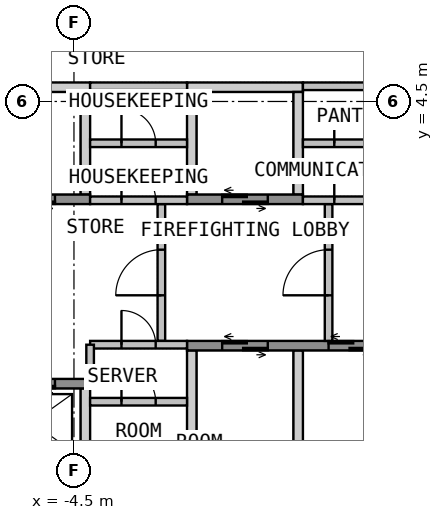
"""IFC4 building model, lengths in metres.
Left out: names, types, materials, properties, quantities, classifications, styles, units other than length and angle.
Written with IfcOpenShell. Run it as: python <this file> out.ifc"""

import sys

from ifc_helpers import new_model, si_unit, direction, frame, frame_2d, origin, place, context, subcontext, project, spatial, polyline, rectangle, outline, extrude, element, fill, save


model = new_model("IFC4")
c1 = context("Model", 3, precision=1e-05, world=origin(), true_north=direction((0.0, 1.0)))
c2 = subcontext(c1, "Body", "Model", "MODEL_VIEW")
j1 = project(units=[si_unit("LENGTHUNIT", "METRE"), si_unit("PLANEANGLEUNIT", "RADIAN")], contexts=[c1])
p1 = place(None, origin())
s1 = spatial("IfcSite", under=j1, at=p1, CompositionType="ELEMENT")
p2 = place(p1, origin())
s2 = spatial("IfcBuilding", under=s1, at=p2, CompositionType="ELEMENT")
p3 = place(p2, frame((0.0, 0.0, 132.6)))
s3 = spatial("IfcBuildingStorey", under=s2, at=p3, CompositionType="ELEMENT", Elevation=132.6)
p4 = place(p3, origin())
e1 = element("IfcWall", 1, at=p4, inside=s3, PredefinedType="SHEAR", context=c2, shape_type="SweptSolid", body=[
    extrude(outline(polyline([(-12.9, 4.75), (-4.075, 4.75), (-4.075, 5.0), (-12.9, 5.0), (-12.9, 4.75)])), origin(), (0.0, 0.0, 1.0), 3.575),
])
p5 = place(p3, origin())
e2 = element("IfcWall", 2, at=p5, inside=s3, PredefinedType="SHEAR", context=c2, shape_type="SweptSolid", body=[
    extrude(outline(polyline([(-1.525, 4.75), (1.525, 4.75), (1.525, 5.0), (-1.525, 5.0), (-1.525, 4.75)])), origin(), (0.0, 0.0, 1.0), 3.575),
])
p6 = place(p3, origin())
e3 = element("IfcWall", 3, at=p6, inside=s3, PredefinedType="SHEAR", context=c2, shape_type="SweptSolid", body=[
    extrude(outline(polyline([(-4.325, 2.05), (-4.075, 2.05), (-4.075, 4.75), (-4.325, 4.75), (-4.325, 2.05)])), origin(), (0.0, 0.0, 1.0), 3.575),
])
p7 = place(p3, origin())
e4 = element("IfcWall", 4, at=p7, inside=s3, PredefinedType="SHEAR", context=c2, shape_type="SweptSolid", body=[
    extrude(outline(polyline([(-1.525, 2.05), (-1.275, 2.05), (-1.275, 4.75), (-1.525, 4.75), (-1.525, 2.05)])), origin(), (0.0, 0.0, 1.0), 3.575),
])
p8 = place(p3, origin())
e5 = element("IfcWall", 5, at=p8, inside=s3, PredefinedType="SHEAR", context=c2, shape_type="SweptSolid", body=[
    extrude(outline(polyline([(1.275, 2.05), (1.525, 2.05), (1.525, 4.75), (1.275, 4.75), (1.275, 2.05)])), origin(), (0.0, 0.0, 1.0), 3.575),
])
p9 = place(p3, frame((-12.9, 1.925, 0.0), z_axis=(0.0, 0.0, 1.0), x_axis=(1.0, 0.0, 0.0)))
e6 = element("IfcWall", 6, at=p9, inside=s3, PredefinedType="SHEAR", context=c2, shape_type="SweptSolid", body=[
    extrude(rectangle(XDim=8.825, YDim=0.25, at=frame_2d((4.413, 0.0))), origin(), (0.0, 0.0, 1.0), 3.575),
])
p10 = place(p9, frame((1.1, 0.0, 0.0)))
e7 = element("IfcOpeningElement", 7, at=p10, cuts=e6, PredefinedType="OPENING", context=c2, shape_type="SweptSolid", body=[
    extrude(rectangle(XDim=1.2, YDim=2.1, at=frame_2d((0.6, 1.05))), frame((0.0, 0.135, 0.0), z_axis=(0.0, -1.0, 0.0), x_axis=(1.0, 0.0, 0.0)), (0.0, 0.0, 1.0), 0.27),
])
p11 = place(p9, frame((3.9, 0.0, 0.0)))
e8 = element("IfcOpeningElement", 8, at=p11, cuts=e6, PredefinedType="OPENING", context=c2, shape_type="SweptSolid", body=[
    extrude(rectangle(XDim=1.2, YDim=2.1, at=frame_2d((0.6, 1.05))), frame((0.0, 0.135, 0.0), z_axis=(0.0, -1.0, 0.0), x_axis=(1.0, 0.0, 0.0)), (0.0, 0.0, 1.0), 0.27),
])
p12 = place(p9, frame((6.7, 0.0, 0.0)))
e9 = element("IfcOpeningElement", 9, at=p12, cuts=e6, PredefinedType="OPENING", context=c2, shape_type="SweptSolid", body=[
    extrude(rectangle(XDim=1.2, YDim=2.1, at=frame_2d((0.6, 1.05))), frame((0.0, 0.135, 0.0), z_axis=(0.0, -1.0, 0.0), x_axis=(1.0, 0.0, 0.0)), (0.0, 0.0, 1.0), 0.27),
])
p13 = place(p3, frame((-1.525, 1.925, 0.0), z_axis=(0.0, 0.0, 1.0), x_axis=(1.0, 0.0, 0.0)))
e10 = element("IfcWall", 10, at=p13, inside=s3, PredefinedType="SHEAR", context=c2, shape_type="SweptSolid", body=[
    extrude(rectangle(XDim=3.05, YDim=0.25, at=frame_2d((1.525, 0.0))), origin(), (0.0, 0.0, 1.0), 3.575),
])
p14 = place(p13, frame((0.925, 0.0, 0.0)))
e11 = element("IfcOpeningElement", 11, at=p14, cuts=e10, PredefinedType="OPENING", context=c2, shape_type="SweptSolid", body=[
    extrude(rectangle(XDim=1.2, YDim=2.1, at=frame_2d((0.6, 1.05))), frame((0.0, 0.135, 0.0), z_axis=(0.0, -1.0, 0.0), x_axis=(1.0, 0.0, 0.0)), (0.0, 0.0, 1.0), 0.27),
])
p15 = place(p3, origin())
e12 = element("IfcWall", 12, at=p15, inside=s3, PredefinedType="SHEAR", context=c2, shape_type="SweptSolid", body=[
    extrude(outline(polyline([(-4.325, -4.75), (-4.075, -4.75), (-4.075, -3.05), (-4.325, -3.05), (-4.325, -4.75)])), origin(), (0.0, 0.0, 1.0), 3.575),
])
p16 = place(p3, origin())
e13 = element("IfcWall", 13, at=p16, inside=s3, PredefinedType="SHEAR", context=c2, shape_type="SweptSolid", body=[
    extrude(outline(polyline([(-1.525, -4.75), (-1.275, -4.75), (-1.275, -2.05), (-1.525, -2.05), (-1.525, -4.75)])), origin(), (0.0, 0.0, 1.0), 3.575),
])
p17 = place(p3, origin())
e14 = element("IfcWall", 14, at=p17, inside=s3, PredefinedType="SHEAR", context=c2, shape_type="SweptSolid", body=[
    extrude(outline(polyline([(1.275, -4.75), (1.525, -4.75), (1.525, -2.05), (1.275, -2.05), (1.275, -4.75)])), origin(), (0.0, 0.0, 1.0), 3.575),
])
p18 = place(p3, frame((-12.9, -2.925, 0.0), z_axis=(0.0, 0.0, 1.0), x_axis=(1.0, 0.0, 0.0)))
e15 = element("IfcWall", 15, at=p18, inside=s3, PredefinedType="SHEAR", context=c2, shape_type="SweptSolid", body=[
    extrude(rectangle(XDim=8.825, YDim=0.25, at=frame_2d((4.413, 0.0))), origin(), (0.0, 0.0, 1.0), 3.575),
])
p19 = place(p18, frame((1.1, 0.0, 0.0)))
e16 = element("IfcOpeningElement", 16, at=p19, cuts=e15, PredefinedType="OPENING", context=c2, shape_type="SweptSolid", body=[
    extrude(rectangle(XDim=1.2, YDim=2.1, at=frame_2d((0.6, 1.05))), frame((0.0, 0.135, 0.0), z_axis=(0.0, -1.0, 0.0), x_axis=(1.0, 0.0, 0.0)), (0.0, 0.0, 1.0), 0.27),
])
p20 = place(p18, frame((3.9, 0.0, 0.0)))
e17 = element("IfcOpeningElement", 17, at=p20, cuts=e15, PredefinedType="OPENING", context=c2, shape_type="SweptSolid", body=[
    extrude(rectangle(XDim=1.2, YDim=2.1, at=frame_2d((0.6, 1.05))), frame((0.0, 0.135, 0.0), z_axis=(0.0, -1.0, 0.0), x_axis=(1.0, 0.0, 0.0)), (0.0, 0.0, 1.0), 0.27),
])
p21 = place(p18, frame((6.7, 0.0, 0.0)))
e18 = element("IfcOpeningElement", 18, at=p21, cuts=e15, PredefinedType="OPENING", context=c2, shape_type="SweptSolid", body=[
    extrude(rectangle(XDim=1.2, YDim=2.1, at=frame_2d((0.6, 1.05))), frame((0.0, 0.135, 0.0), z_axis=(0.0, -1.0, 0.0), x_axis=(1.0, 0.0, 0.0)), (0.0, 0.0, 1.0), 0.27),
])
p22 = place(p3, frame((-1.525, -1.925, 0.0), z_axis=(0.0, 0.0, 1.0), x_axis=(1.0, 0.0, 0.0)))
e19 = element("IfcWall", 19, at=p22, inside=s3, PredefinedType="SHEAR", context=c2, shape_type="SweptSolid", body=[
    extrude(rectangle(XDim=14.425, YDim=0.25, at=frame_2d((7.212, 0.0))), origin(), (0.0, 0.0, 1.0), 3.575),
])
p23 = place(p22, frame((0.925, 0.0, 0.0)))
e20 = element("IfcOpeningElement", 20, at=p23, cuts=e19, PredefinedType="OPENING", context=c2, shape_type="SweptSolid", body=[
    extrude(rectangle(XDim=1.2, YDim=2.1, at=frame_2d((0.6, 1.05))), frame((0.0, 0.135, 0.0), z_axis=(0.0, -1.0, 0.0), x_axis=(1.0, 0.0, 0.0)), (0.0, 0.0, 1.0), 0.27),
])
p24 = place(p22, frame((3.725, 0.0, 0.0)))
e21 = element("IfcOpeningElement", 21, at=p24, cuts=e19, PredefinedType="OPENING", context=c2, shape_type="SweptSolid", body=[
    extrude(rectangle(XDim=1.2, YDim=2.1, at=frame_2d((0.6, 1.05))), frame((0.0, 0.135, 0.0), z_axis=(0.0, -1.0, 0.0), x_axis=(1.0, 0.0, 0.0)), (0.0, 0.0, 1.0), 0.27),
])
p25 = place(p3, frame((-2.2, -1.8, 0.0), z_axis=(0.0, 0.0, 1.0), x_axis=(0.0, 1.0, 0.0)))
e22 = element("IfcWall", 22, at=p25, inside=s3, PredefinedType="PARTITIONING", context=c2, shape_type="SweptSolid", body=[
    extrude(rectangle(XDim=3.6, YDim=0.2, at=frame_2d((1.8, 0.0))), origin(), (0.0, 0.0, 1.0), 3.575),
])
p26 = place(p25, frame((1.2, 0.0, 0.0)))
e23 = element("IfcOpeningElement", 23, at=p26, cuts=e22, PredefinedType="OPENING", context=c2, shape_type="SweptSolid", body=[
    extrude(rectangle(XDim=1.2, YDim=2.1, at=frame_2d((0.6, 1.05))), frame((0.0, 0.11, 0.0), z_axis=(0.0, -1.0, 0.0), x_axis=(1.0, 0.0, 0.0)), (0.0, 0.0, 1.0), 0.22),
])
p27 = place(p3, frame((2.2, -1.8, 0.0), z_axis=(0.0, 0.0, 1.0), x_axis=(0.0, 1.0, 0.0)))
e24 = element("IfcWall", 24, at=p27, inside=s3, PredefinedType="PARTITIONING", context=c2, shape_type="SweptSolid", body=[
    extrude(rectangle(XDim=3.6, YDim=0.2, at=frame_2d((1.8, 0.0))), origin(), (0.0, 0.0, 1.0), 3.575),
])
p28 = place(p27, frame((1.2, 0.0, 0.0)))
e25 = element("IfcOpeningElement", 25, at=p28, cuts=e24, PredefinedType="OPENING", context=c2, shape_type="SweptSolid", body=[
    extrude(rectangle(XDim=1.2, YDim=2.1, at=frame_2d((0.6, 1.05))), frame((0.0, 0.11, 0.0), z_axis=(0.0, -1.0, 0.0), x_axis=(1.0, 0.0, 0.0)), (0.0, 0.0, 1.0), 0.22),
])
p29 = place(p3, frame((-4.075, 3.4, 0.0), z_axis=(0.0, 0.0, 1.0), x_axis=(1.0, 0.0, 0.0)))
e26 = element("IfcWall", 26, at=p29, inside=s3, PredefinedType="PARTITIONING", context=c2, shape_type="SweptSolid", body=[
    extrude(rectangle(XDim=2.55, YDim=0.2, at=frame_2d((1.275, 0.0))), origin(), (0.0, 0.0, 1.0), 3.575),
])
p30 = place(p29, frame((0.825, 0.0, 0.0)))
e27 = element("IfcOpeningElement", 27, at=p30, cuts=e26, PredefinedType="OPENING", context=c2, shape_type="SweptSolid", body=[
    extrude(rectangle(XDim=0.9, YDim=2.1, at=frame_2d((0.45, 1.05))), frame((0.0, 0.11, 0.0), z_axis=(0.0, -1.0, 0.0), x_axis=(1.0, 0.0, 0.0)), (0.0, 0.0, 1.0), 0.22),
])
p31 = place(p3, frame((-4.075, 1.9, 0.0), z_axis=(0.0, 0.0, 1.0), x_axis=(1.0, 0.0, 0.0)))
e28 = element("IfcWall", 28, at=p31, inside=s3, PredefinedType="PARTITIONING", context=c2, shape_type="SweptSolid", body=[
    extrude(rectangle(XDim=2.55, YDim=0.2, at=frame_2d((1.275, 0.0))), origin(), (0.0, 0.0, 1.0), 3.575),
])
p32 = place(p31, frame((0.825, 0.0, 0.0)))
e29 = element("IfcOpeningElement", 29, at=p32, cuts=e28, PredefinedType="OPENING", context=c2, shape_type="SweptSolid", body=[
    extrude(rectangle(XDim=0.9, YDim=2.1, at=frame_2d((0.45, 1.05))), frame((0.0, 0.11, 0.0), z_axis=(0.0, -1.0, 0.0), x_axis=(1.0, 0.0, 0.0)), (0.0, 0.0, 1.0), 0.22),
])
p33 = place(p3, frame((-4.075, 4.9, 0.0), z_axis=(0.0, 0.0, 1.0), x_axis=(1.0, 0.0, 0.0)))
e30 = element("IfcWall", 30, at=p33, inside=s3, PredefinedType="PARTITIONING", context=c2, shape_type="SweptSolid", body=[
    extrude(rectangle(XDim=2.55, YDim=0.2, at=frame_2d((1.275, 0.0))), origin(), (0.0, 0.0, 1.0), 3.575),
])
p34 = place(p3, frame((1.525, 3.4, 0.0), z_axis=(0.0, 0.0, 1.0), x_axis=(1.0, 0.0, 0.0)))
e31 = element("IfcWall", 31, at=p34, inside=s3, PredefinedType="PARTITIONING", context=c2, shape_type="SweptSolid", body=[
    extrude(rectangle(XDim=2.55, YDim=0.2, at=frame_2d((1.275, 0.0))), origin(), (0.0, 0.0, 1.0), 3.575),
])
p35 = place(p34, frame((0.825, 0.0, 0.0)))
e32 = element("IfcOpeningElement", 32, at=p35, cuts=e31, PredefinedType="OPENING", context=c2, shape_type="SweptSolid", body=[
    extrude(rectangle(XDim=0.9, YDim=2.1, at=frame_2d((0.45, 1.05))), frame((0.0, 0.11, 0.0), z_axis=(0.0, -1.0, 0.0), x_axis=(1.0, 0.0, 0.0)), (0.0, 0.0, 1.0), 0.22),
])
p36 = place(p3, frame((1.525, 1.9, 0.0), z_axis=(0.0, 0.0, 1.0), x_axis=(1.0, 0.0, 0.0)))
e33 = element("IfcWall", 33, at=p36, inside=s3, PredefinedType="PARTITIONING", context=c2, shape_type="SweptSolid", body=[
    extrude(rectangle(XDim=2.55, YDim=0.2, at=frame_2d((1.275, 0.0))), origin(), (0.0, 0.0, 1.0), 3.575),
])
p37 = place(p36, frame((0.825, 0.0, 0.0)))
e34 = element("IfcOpeningElement", 34, at=p37, cuts=e33, PredefinedType="OPENING", context=c2, shape_type="SweptSolid", body=[
    extrude(rectangle(XDim=0.9, YDim=2.1, at=frame_2d((0.45, 1.05))), frame((0.0, 0.11, 0.0), z_axis=(0.0, -1.0, 0.0), x_axis=(1.0, 0.0, 0.0)), (0.0, 0.0, 1.0), 0.22),
])
p38 = place(p3, frame((1.525, 4.9, 0.0), z_axis=(0.0, 0.0, 1.0), x_axis=(1.0, 0.0, 0.0)))
e35 = element("IfcWall", 35, at=p38, inside=s3, PredefinedType="PARTITIONING", context=c2, shape_type="SweptSolid", body=[
    extrude(rectangle(XDim=2.55, YDim=0.2, at=frame_2d((1.275, 0.0))), origin(), (0.0, 0.0, 1.0), 3.575),
])
p39 = place(p3, frame((-4.075, -3.4, 0.0), z_axis=(0.0, 0.0, 1.0), x_axis=(1.0, 0.0, 0.0)))
e36 = element("IfcWall", 36, at=p39, inside=s3, PredefinedType="PARTITIONING", context=c2, shape_type="SweptSolid", body=[
    extrude(rectangle(XDim=2.55, YDim=0.2, at=frame_2d((1.275, 0.0))), origin(), (0.0, 0.0, 1.0), 3.575),
])
p40 = place(p39, frame((0.825, 0.0, 0.0)))
e37 = element("IfcOpeningElement", 37, at=p40, cuts=e36, PredefinedType="OPENING", context=c2, shape_type="SweptSolid", body=[
    extrude(rectangle(XDim=0.9, YDim=2.1, at=frame_2d((0.45, 1.05))), frame((0.0, 0.11, 0.0), z_axis=(0.0, -1.0, 0.0), x_axis=(1.0, 0.0, 0.0)), (0.0, 0.0, 1.0), 0.22),
])
p41 = place(p3, frame((-4.075, -1.9, 0.0), z_axis=(0.0, 0.0, 1.0), x_axis=(1.0, 0.0, 0.0)))
e38 = element("IfcWall", 38, at=p41, inside=s3, PredefinedType="PARTITIONING", context=c2, shape_type="SweptSolid", body=[
    extrude(rectangle(XDim=2.55, YDim=0.2, at=frame_2d((1.275, 0.0))), origin(), (0.0, 0.0, 1.0), 3.575),
])
p42 = place(p41, frame((0.825, 0.0, 0.0)))
e39 = element("IfcOpeningElement", 39, at=p42, cuts=e38, PredefinedType="OPENING", context=c2, shape_type="SweptSolid", body=[
    extrude(rectangle(XDim=0.9, YDim=2.1, at=frame_2d((0.45, 1.05))), frame((0.0, 0.11, 0.0), z_axis=(0.0, -1.0, 0.0), x_axis=(1.0, 0.0, 0.0)), (0.0, 0.0, 1.0), 0.22),
])
p43 = place(p3, frame((-4.075, -1.9, 0.0), z_axis=(0.0, 0.0, 1.0), x_axis=(0.0, -1.0, 0.0)))
e40 = element("IfcWall", 40, at=p43, inside=s3, PredefinedType="PARTITIONING", context=c2, shape_type="SweptSolid", body=[
    extrude(rectangle(XDim=1.15, YDim=0.2, at=frame_2d((0.575, 0.0))), origin(), (0.0, 0.0, 1.0), 3.575),
])
p44 = place(p12, origin())
e41 = element("IfcDoor", 41, at=p44, inside=s3, OperationType="DOUBLE_DOOR_SLIDING", PredefinedType="DOOR", context=c2, shape_type="SweptSolid", body=[
    extrude(rectangle(XDim=1.2, YDim=2.1, at=frame_2d((0.6, 1.05))), frame((0.0, 0.025, 0.0), z_axis=(0.0, -1.0, 0.0), x_axis=(1.0, 0.0, 0.0)), (0.0, 0.0, 1.0), 0.05),
])
fill(e9, e41)
p45 = place(p14, origin())
e42 = element("IfcDoor", 42, at=p45, inside=s3, OperationType="DOUBLE_DOOR_SLIDING", PredefinedType="DOOR", context=c2, shape_type="SweptSolid", body=[
    extrude(rectangle(XDim=1.2, YDim=2.1, at=frame_2d((0.6, 1.05))), frame((0.0, 0.025, 0.0), z_axis=(0.0, -1.0, 0.0), x_axis=(1.0, 0.0, 0.0)), (0.0, 0.0, 1.0), 0.05),
])
fill(e11, e42)
p46 = place(p21, origin())
e43 = element("IfcDoor", 43, at=p46, inside=s3, OperationType="DOUBLE_DOOR_SLIDING", PredefinedType="DOOR", context=c2, shape_type="SweptSolid", body=[
    extrude(rectangle(XDim=1.2, YDim=2.1, at=frame_2d((0.6, 1.05))), frame((0.0, 0.025, 0.0), z_axis=(0.0, -1.0, 0.0), x_axis=(1.0, 0.0, 0.0)), (0.0, 0.0, 1.0), 0.05),
])
fill(e18, e43)
p47 = place(p23, origin())
e44 = element("IfcDoor", 44, at=p47, inside=s3, OperationType="DOUBLE_DOOR_SLIDING", PredefinedType="DOOR", context=c2, shape_type="SweptSolid", body=[
    extrude(rectangle(XDim=1.2, YDim=2.1, at=frame_2d((0.6, 1.05))), frame((0.0, 0.025, 0.0), z_axis=(0.0, -1.0, 0.0), x_axis=(1.0, 0.0, 0.0)), (0.0, 0.0, 1.0), 0.05),
])
fill(e20, e44)
p48 = place(p24, origin())
e45 = element("IfcDoor", 45, at=p48, inside=s3, OperationType="DOUBLE_DOOR_SLIDING", PredefinedType="DOOR", context=c2, shape_type="SweptSolid", body=[
    extrude(rectangle(XDim=1.2, YDim=2.1, at=frame_2d((0.6, 1.05))), frame((0.0, 0.025, 0.0), z_axis=(0.0, -1.0, 0.0), x_axis=(1.0, 0.0, 0.0)), (0.0, 0.0, 1.0), 0.05),
])
fill(e21, e45)
p49 = place(p26, origin())
e46 = element("IfcDoor", 46, at=p49, inside=s3, OperationType="SINGLE_SWING_LEFT", PredefinedType="DOOR", context=c2, shape_type="SweptSolid", body=[
    extrude(rectangle(XDim=1.2, YDim=2.1, at=frame_2d((0.6, 1.05))), frame((0.0, 0.025, 0.0), z_axis=(0.0, -1.0, 0.0), x_axis=(1.0, 0.0, 0.0)), (0.0, 0.0, 1.0), 0.05),
])
fill(e23, e46)
p50 = place(p28, origin())
e47 = element("IfcDoor", 47, at=p50, inside=s3, OperationType="SINGLE_SWING_LEFT", PredefinedType="DOOR", context=c2, shape_type="SweptSolid", body=[
    extrude(rectangle(XDim=1.2, YDim=2.1, at=frame_2d((0.6, 1.05))), frame((0.0, 0.025, 0.0), z_axis=(0.0, -1.0, 0.0), x_axis=(1.0, 0.0, 0.0)), (0.0, 0.0, 1.0), 0.05),
])
fill(e25, e47)
p51 = place(p30, origin())
e48 = element("IfcDoor", 48, at=p51, inside=s3, OperationType="SINGLE_SWING_LEFT", PredefinedType="DOOR", context=c2, shape_type="SweptSolid", body=[
    extrude(rectangle(XDim=0.9, YDim=2.1, at=frame_2d((0.45, 1.05))), frame((0.0, 0.025, 0.0), z_axis=(0.0, -1.0, 0.0), x_axis=(1.0, 0.0, 0.0)), (0.0, 0.0, 1.0), 0.05),
])
fill(e27, e48)
p52 = place(p32, origin())
e49 = element("IfcDoor", 49, at=p52, inside=s3, OperationType="SINGLE_SWING_LEFT", PredefinedType="DOOR", context=c2, shape_type="SweptSolid", body=[
    extrude(rectangle(XDim=0.9, YDim=2.1, at=frame_2d((0.45, 1.05))), frame((0.0, 0.025, 0.0), z_axis=(0.0, -1.0, 0.0), x_axis=(1.0, 0.0, 0.0)), (0.0, 0.0, 1.0), 0.05),
])
fill(e29, e49)
p53 = place(p35, origin())
e50 = element("IfcDoor", 50, at=p53, inside=s3, OperationType="SINGLE_SWING_LEFT", PredefinedType="DOOR", context=c2, shape_type="SweptSolid", body=[
    extrude(rectangle(XDim=0.9, YDim=2.1, at=frame_2d((0.45, 1.05))), frame((0.0, 0.025, 0.0), z_axis=(0.0, -1.0, 0.0), x_axis=(1.0, 0.0, 0.0)), (0.0, 0.0, 1.0), 0.05),
])
fill(e32, e50)
p54 = place(p37, origin())
e51 = element("IfcDoor", 51, at=p54, inside=s3, OperationType="SINGLE_SWING_LEFT", PredefinedType="DOOR", context=c2, shape_type="SweptSolid", body=[
    extrude(rectangle(XDim=0.9, YDim=2.1, at=frame_2d((0.45, 1.05))), frame((0.0, 0.025, 0.0), z_axis=(0.0, -1.0, 0.0), x_axis=(1.0, 0.0, 0.0)), (0.0, 0.0, 1.0), 0.05),
])
fill(e34, e51)
p55 = place(p40, origin())
e52 = element("IfcDoor", 52, at=p55, inside=s3, OperationType="SINGLE_SWING_LEFT", PredefinedType="DOOR", context=c2, shape_type="SweptSolid", body=[
    extrude(rectangle(XDim=0.9, YDim=2.1, at=frame_2d((0.45, 1.05))), frame((0.0, 0.025, 0.0), z_axis=(0.0, -1.0, 0.0), x_axis=(1.0, 0.0, 0.0)), (0.0, 0.0, 1.0), 0.05),
])
fill(e37, e52)
p56 = place(p42, origin())
e53 = element("IfcDoor", 53, at=p56, inside=s3, OperationType="SINGLE_SWING_LEFT", PredefinedType="DOOR", context=c2, shape_type="SweptSolid", body=[
    extrude(rectangle(XDim=0.9, YDim=2.1, at=frame_2d((0.45, 1.05))), frame((0.0, 0.025, 0.0), z_axis=(0.0, -1.0, 0.0), x_axis=(1.0, 0.0, 0.0)), (0.0, 0.0, 1.0), 0.05),
])
fill(e39, e53)
save(model, sys.argv[1])
